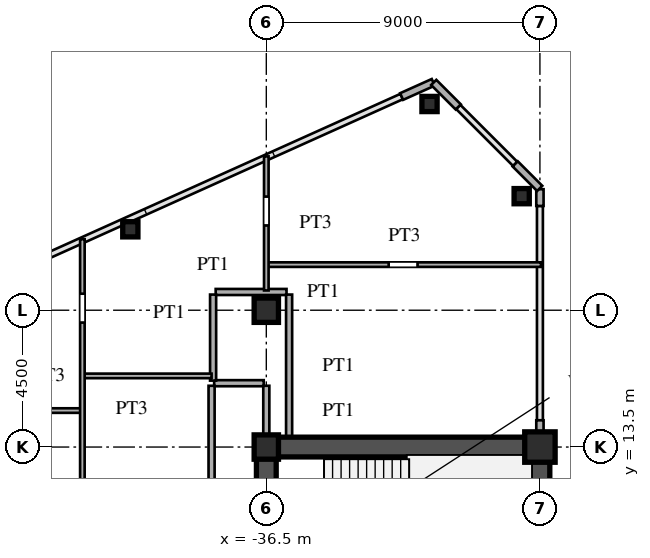
"""IFC4 building model, lengths in metres.
Left out: names, types, materials, properties, quantities, classifications, styles, units other than length and angle.
Written with IfcOpenShell. Run it as: python <this file> out.ifc"""

import sys

from ifc_helpers import new_model, si_unit, direction, frame, frame_2d, origin, origin_2d, place, context, subcontext, project, spatial, rectangle, hollow_rectangle, i_section, extrude, source, transform, mapped, element, save


model = new_model("IFC4")
c1 = context("Model", 3, precision=1e-05, world=origin(), true_north=direction((0.0, 1.0)))
c2 = subcontext(c1, "Body", "Model", "MODEL_VIEW")
j1 = project(units=[si_unit("LENGTHUNIT", "METRE"), si_unit("PLANEANGLEUNIT", "RADIAN")], contexts=[c1])
p1 = place(None, origin())
s1 = spatial("IfcSite", under=j1, at=p1, CompositionType="ELEMENT")
p2 = place(p1, origin())
s2 = spatial("IfcBuilding", under=s1, at=p2, CompositionType="ELEMENT")
p3 = place(p2, frame((0.0, 0.0, 106.8)))
s3 = spatial("IfcBuildingStorey", under=s2, at=p3, CompositionType="ELEMENT", Elevation=106.8)
m1 = source(origin(), c2, "Body", "SweptSolid", [
    extrude(hollow_rectangle(XDim=1.0, YDim=1.0, WallThickness=0.042, at=origin_2d()), origin(), (0.0, 0.0, 1.0), 3.6),
])
p4 = place(p3, frame((-27.5, 13.5, 0.0), z_axis=(0.0, 0.0, 1.0), x_axis=(1.0, 0.0, 0.0)))
e1 = element("IfcColumn", 1, at=p4, inside=s3, PredefinedType="COLUMN", context=c2, shape_type="MappedRepresentation", body=[
    mapped(m1, transform((0.0, 0.0, 0.0), scale=1.0)),
])
m2 = source(origin(), c2, "Body", "SweptSolid", [
    extrude(i_section(OverallWidth=0.8, OverallDepth=0.8, WebThickness=0.032, FlangeThickness=0.05, at=origin_2d()), origin(), (0.0, 0.0, 1.0), 3.6),
])
for number, where, z_axis, x_axis in (
    (2, (-36.5, 13.5, 0.0), (0.0, 0.0, 1.0), (1.0, 0.0, 0.0)),
    (3, (-36.5, 18.0, 0.0), (0.0, 0.0, 1.0), (1.0, 0.0, 0.0)),
):
    element("IfcColumn", number, at=place(p3, frame(where, z_axis=z_axis, x_axis=x_axis)), inside=s3, PredefinedType="COLUMN", context=c2, shape_type="MappedRepresentation", body=[
        mapped(m2, transform((0.0, 0.0, 0.0), scale=1.0)),
    ])
m3 = source(origin(), c2, "Body", "SweptSolid", [
    extrude(hollow_rectangle(XDim=0.5, YDim=0.5, WallThickness=0.02, at=origin_2d()), origin(), (0.0, 0.0, 1.0), 3.6),
])
for number, where, z_axis, x_axis in (
    (4, (-28.1, 21.751, 0.0), (0.0, 0.0, 1.0), (1.0, 0.0, 0.0)),
    (5, (-31.131, 24.783, 0.0), (0.0, 0.0, 1.0), (1.0, 0.0, 0.0)),
    (6, (-40.973, 20.661, 0.0), (0.0, 0.0, 1.0), (1.0, 0.0, 0.0)),
):
    element("IfcColumn", number, at=place(p3, frame(where, z_axis=z_axis, x_axis=x_axis)), inside=s3, PredefinedType="COLUMN", context=c2, shape_type="MappedRepresentation", body=[
        mapped(m3, transform((0.0, 0.0, 0.0), scale=1.0)),
    ])
p5 = place(p3, frame((-27.5, 13.83, 0.0), z_axis=(0.0, 0.0, 1.0), x_axis=(0.0, 1.0, 0.0)))
e7 = element("IfcWall", 7, at=p5, inside=s3, PredefinedType="SOLIDWALL", context=c2, shape_type="SweptSolid", body=[
    extrude(rectangle(XDim=0.55, YDim=0.24, at=frame_2d((0.275, 0.0))), origin(), (0.0, 0.0, 1.0), 1.88),
])
p6 = place(p3, frame((-27.5, 21.43, 0.0), z_axis=(0.0, 0.0, 1.0), x_axis=(0.0, 1.0, 0.0)))
e8 = element("IfcWall", 8, at=p6, inside=s3, PredefinedType="SOLIDWALL", context=c2, shape_type="SweptSolid", body=[
    extrude(rectangle(XDim=0.55, YDim=0.24, at=frame_2d((0.275, 0.0))), origin(), (0.0, 0.0, 1.0), 3.38),
])
for number, where, z_axis, x_axis in (
    (9, (-27.507, 22.007, 0.0), (0.0, 0.0, 1.0), (-0.707, 0.707, 0.0)),
    (10, (-30.187, 24.687, 0.0), (0.0, 0.0, 1.0), (-0.707, 0.707, 0.0)),
):
    element("IfcWall", number, at=place(p3, frame(where, z_axis=z_axis, x_axis=x_axis)), inside=s3, PredefinedType="SOLIDWALL", context=c2, shape_type="SweptSolid", body=[
        extrude(rectangle(XDim=1.14, YDim=0.24, at=frame_2d((0.57, 0.0))), origin(), (0.0, 0.0, 1.0), 3.38),
    ])
p7 = place(p3, frame((-31.009, 25.496, 0.0), z_axis=(0.0, 0.0, 1.0), x_axis=(-0.911929519623, -0.410346866979, 0.0)))
e11 = element("IfcWall", 11, at=p7, inside=s3, PredefinedType="SOLIDWALL", context=c2, shape_type="SweptSolid", body=[
    extrude(rectangle(XDim=1.14, YDim=0.24, at=frame_2d((0.57, 0.0))), origin(), (0.0, 0.0, 1.0), 3.38),
])
p8 = place(p3, frame((-27.5, 1.3, 0.0), z_axis=(0.0, 0.0, 1.0), x_axis=(0.0, 1.0, 0.0)))
e12 = element("IfcWall", 12, at=p8, inside=s3, PredefinedType="SHEAR", context=c2, shape_type="SweptSolid", body=[
    extrude(rectangle(XDim=12.2, YDim=0.65, at=frame_2d((6.1, 0.0))), origin(), (0.0, 0.0, 1.0), 3.38),
])
p9 = place(p3, frame((-36.5, 13.5, 0.0), z_axis=(0.0, 0.0, 1.0), x_axis=(1.0, 0.0, 0.0)))
e13 = element("IfcWall", 13, at=p9, inside=s3, PredefinedType="SHEAR", context=c2, shape_type="SweptSolid", body=[
    extrude(rectangle(XDim=9.0, YDim=0.65, at=frame_2d((4.5, 0.0))), origin(), (0.0, 0.0, 1.0), 3.38),
])
p10 = place(p3, frame((-36.5, 8.2, 0.0), z_axis=(0.0, 0.0, 1.0), x_axis=(0.0, 1.0, 0.0)))
e14 = element("IfcWall", 14, at=p10, inside=s3, PredefinedType="SHEAR", context=c2, shape_type="SweptSolid", body=[
    extrude(rectangle(XDim=5.45, YDim=0.65, at=frame_2d((2.725, 0.0))), origin(), (0.0, 0.0, 1.0), 3.38),
])
p11 = place(p10, frame((0.245, 0.0, 0.0)))
e15 = element("IfcOpeningElement", 15, at=p11, cuts=e14, PredefinedType="OPENING", context=c2, shape_type="SweptSolid", body=[
    extrude(rectangle(XDim=0.95, YDim=2.15, at=frame_2d((0.475, 1.075))), frame((0.0, 0.335, 0.0), z_axis=(0.0, -1.0, 0.0), x_axis=(1.0, 0.0, 0.0)), (0.0, 0.0, 1.0), 0.67),
])
p12 = place(p3, frame((-54.45, 14.7, 0.0), z_axis=(0.0, 0.0, 1.0), x_axis=(1.0, 0.0, 0.0)))
e16 = element("IfcWall", 16, at=p12, inside=s3, PredefinedType="PARTITIONING", context=c2, shape_type="SweptSolid", body=[
    extrude(rectangle(XDim=11.85, YDim=0.15, at=frame_2d((5.925, 0.0))), origin(), (0.0, 0.0, 1.0), 3.38),
])
p13 = place(p12, frame((2.244, 0.0, 0.0)))
e17 = element("IfcOpeningElement", 17, at=p13, cuts=e16, PredefinedType="OPENING", context=c2, shape_type="SweptSolid", body=[
    extrude(rectangle(XDim=0.95, YDim=2.15, at=frame_2d((0.475, 1.075))), frame((0.0, 0.085, 0.0), z_axis=(0.0, -1.0, 0.0), x_axis=(1.0, 0.0, 0.0)), (0.0, 0.0, 1.0), 0.17),
])
p14 = place(p3, frame((-38.215, 15.6, 0.0), z_axis=(0.0, 0.0, 1.0), x_axis=(1.0, 0.0, 0.0)))
e18 = element("IfcWall", 18, at=p14, inside=s3, PredefinedType="PARTITIONING", context=c2, shape_type="SweptSolid", body=[
    extrude(rectangle(XDim=1.63, YDim=0.2, at=frame_2d((0.815, 0.0))), origin(), (0.0, 0.0, 1.0), 3.38),
])
p15 = place(p3, frame((-42.5, 15.84, 0.0), z_axis=(0.0, 0.0, 1.0), x_axis=(1.0, 0.0, 0.0)))
e19 = element("IfcWall", 19, at=p15, inside=s3, PredefinedType="PARTITIONING", context=c2, shape_type="SweptSolid", body=[
    extrude(rectangle(XDim=4.2, YDim=0.15, at=frame_2d((2.1, 0.0))), origin(), (0.0, 0.0, 1.0), 3.38),
])
p16 = place(p3, frame((-38.165, 18.6, 0.0), z_axis=(0.0, 0.0, 1.0), x_axis=(1.0, 0.0, 0.0)))
e20 = element("IfcWall", 20, at=p16, inside=s3, PredefinedType="PARTITIONING", context=c2, shape_type="SweptSolid", body=[
    extrude(rectangle(XDim=0.753, YDim=0.2, at=frame_2d((0.376, 0.0))), origin(), (0.0, 0.0, 1.0), 2.08),
])
p17 = place(p3, frame((-37.412, 18.6, 0.0), z_axis=(0.0, 0.0, 1.0), x_axis=(1.0, 0.0, 0.0)))
e21 = element("IfcWall", 21, at=p17, inside=s3, PredefinedType="PARTITIONING", context=c2, shape_type="SweptSolid", body=[
    extrude(rectangle(XDim=1.577, YDim=0.2, at=frame_2d((0.789, 0.0))), origin(), (0.0, 0.0, 1.0), 3.38),
])
p18 = place(p3, frame((-36.45, 19.5, 0.0), z_axis=(0.0, 0.0, 1.0), x_axis=(1.0, 0.0, 0.0)))
e22 = element("IfcWall", 22, at=p18, inside=s3, PredefinedType="PARTITIONING", context=c2, shape_type="SweptSolid", body=[
    extrude(rectangle(XDim=8.985, YDim=0.15, at=frame_2d((4.492, 0.0))), origin(), (0.0, 0.0, 1.0), 3.38),
])
p19 = place(p18, frame((3.975, 0.0, 0.0)))
e23 = element("IfcOpeningElement", 23, at=p19, cuts=e22, PredefinedType="OPENING", context=c2, shape_type="SweptSolid", body=[
    extrude(rectangle(XDim=0.95, YDim=2.15, at=frame_2d((0.475, 1.075))), frame((0.0, 0.085, 0.0), z_axis=(0.0, -1.0, 0.0), x_axis=(1.0, 0.0, 0.0)), (0.0, 0.0, 1.0), 0.17),
])
p20 = place(p3, frame((-42.55, 9.151, 0.0), z_axis=(0.0, 0.0, 1.0), x_axis=(0.0, 1.0, 0.0)))
e24 = element("IfcWall", 24, at=p20, inside=s3, PredefinedType="PARTITIONING", context=c2, shape_type="SweptSolid", body=[
    extrude(rectangle(XDim=11.186, YDim=0.15, at=frame_2d((5.593, 0.0))), origin(), (0.0, 0.0, 1.0), 3.38),
])
p21 = place(p20, frame((2.275, 0.0, 0.0)))
e25 = element("IfcOpeningElement", 25, at=p21, cuts=e24, PredefinedType="OPENING", context=c2, shape_type="SweptSolid", body=[
    extrude(rectangle(XDim=0.95, YDim=2.15, at=frame_2d((0.475, 1.075))), frame((0.0, 0.085, 0.0), z_axis=(0.0, -1.0, 0.0), x_axis=(1.0, 0.0, 0.0)), (0.0, 0.0, 1.0), 0.17),
])
p22 = place(p20, frame((8.443, 0.0, 0.0)))
e26 = element("IfcOpeningElement", 26, at=p22, cuts=e24, PredefinedType="OPENING", context=c2, shape_type="SweptSolid", body=[
    extrude(rectangle(XDim=0.95, YDim=2.15, at=frame_2d((0.475, 1.075))), frame((0.0, 0.085, 0.0), z_axis=(0.0, -1.0, 0.0), x_axis=(1.0, 0.0, 0.0)), (0.0, 0.0, 1.0), 0.17),
])
p23 = place(p3, frame((-38.3, -15.515, 0.0), z_axis=(0.0, 0.0, 1.0), x_axis=(0.0, 1.0, 0.0)))
e27 = element("IfcWall", 27, at=p23, inside=s3, PredefinedType="PARTITIONING", context=c2, shape_type="SweptSolid", body=[
    extrude(rectangle(XDim=31.03, YDim=0.2, at=frame_2d((15.515, 0.0))), origin(), (0.0, 0.0, 1.0), 3.38),
])
p24 = place(p23, frame((3.093, 0.0, 0.0)))
e28 = element("IfcOpeningElement", 28, at=p24, cuts=e27, PredefinedType="OPENING", context=c2, shape_type="SweptSolid", body=[
    extrude(rectangle(XDim=1.05, YDim=2.25, at=frame_2d((0.525, 1.125))), frame((0.0, 0.11, 0.0), z_axis=(0.0, -1.0, 0.0), x_axis=(1.0, 0.0, 0.0)), (0.0, 0.0, 1.0), 0.22),
])
p25 = place(p23, frame((11.28, 0.0, 0.0)))
e29 = element("IfcOpeningElement", 29, at=p25, cuts=e27, PredefinedType="OPENING", context=c2, shape_type="SweptSolid", body=[
    extrude(rectangle(XDim=1.05, YDim=2.25, at=frame_2d((0.525, 1.125))), frame((0.0, 0.11, 0.0), z_axis=(0.0, -1.0, 0.0), x_axis=(1.0, 0.0, 0.0)), (0.0, 0.0, 1.0), 0.22),
])
p26 = place(p23, frame((19.887, 0.0, 0.0)))
e30 = element("IfcOpeningElement", 30, at=p26, cuts=e27, PredefinedType="OPENING", context=c2, shape_type="SweptSolid", body=[
    extrude(rectangle(XDim=1.05, YDim=2.25, at=frame_2d((0.525, 1.125))), frame((0.0, 0.11, 0.0), z_axis=(0.0, -1.0, 0.0), x_axis=(1.0, 0.0, 0.0)), (0.0, 0.0, 1.0), 0.22),
])
p27 = place(p3, frame((-38.25, 15.685, 0.0), z_axis=(0.0, 0.0, 1.0), x_axis=(0.0, 1.0, 0.0)))
e31 = element("IfcWall", 31, at=p27, inside=s3, PredefinedType="PARTITIONING", context=c2, shape_type="SweptSolid", body=[
    extrude(rectangle(XDim=2.83, YDim=0.2, at=frame_2d((1.415, 0.0))), origin(), (0.0, 0.0, 1.0), 3.38),
])
p28 = place(p3, frame((-36.5, 13.83, 0.0), z_axis=(0.0, 0.0, 1.0), x_axis=(0.0, 1.0, 0.0)))
e32 = element("IfcWall", 32, at=p28, inside=s3, PredefinedType="PARTITIONING", context=c2, shape_type="SweptSolid", body=[
    extrude(rectangle(XDim=1.685, YDim=0.2, at=frame_2d((0.842, 0.0))), origin(), (0.0, 0.0, 1.0), 1.38),
])
p29 = place(p3, frame((-36.5, 18.65, 0.0), z_axis=(0.0, 0.0, 1.0), x_axis=(0.0, 1.0, 0.0)))
e33 = element("IfcWall", 33, at=p29, inside=s3, PredefinedType="PARTITIONING", context=c2, shape_type="SweptSolid", body=[
    extrude(rectangle(XDim=4.41, YDim=0.15, at=frame_2d((2.205, 0.0))), origin(), (0.0, 0.0, 1.0), 3.38),
])
p30 = place(p29, frame((2.137, 0.0, 0.0)))
e34 = element("IfcOpeningElement", 34, at=p30, cuts=e33, PredefinedType="OPENING", context=c2, shape_type="SweptSolid", body=[
    extrude(rectangle(XDim=0.95, YDim=2.15, at=frame_2d((0.475, 1.075))), frame((0.0, 0.085, 0.0), z_axis=(0.0, -1.0, 0.0), x_axis=(1.0, 0.0, 0.0)), (0.0, 0.0, 1.0), 0.17),
])
p31 = place(p3, frame((-35.75, 13.83, 0.0), z_axis=(0.0, 0.0, 1.0), x_axis=(0.0, 1.0, 0.0)))
e35 = element("IfcWall", 35, at=p31, inside=s3, PredefinedType="PARTITIONING", context=c2, shape_type="SweptSolid", body=[
    extrude(rectangle(XDim=4.685, YDim=0.2, at=frame_2d((2.342, 0.0))), origin(), (0.0, 0.0, 1.0), 3.38),
])
save(model, sys.argv[1])
